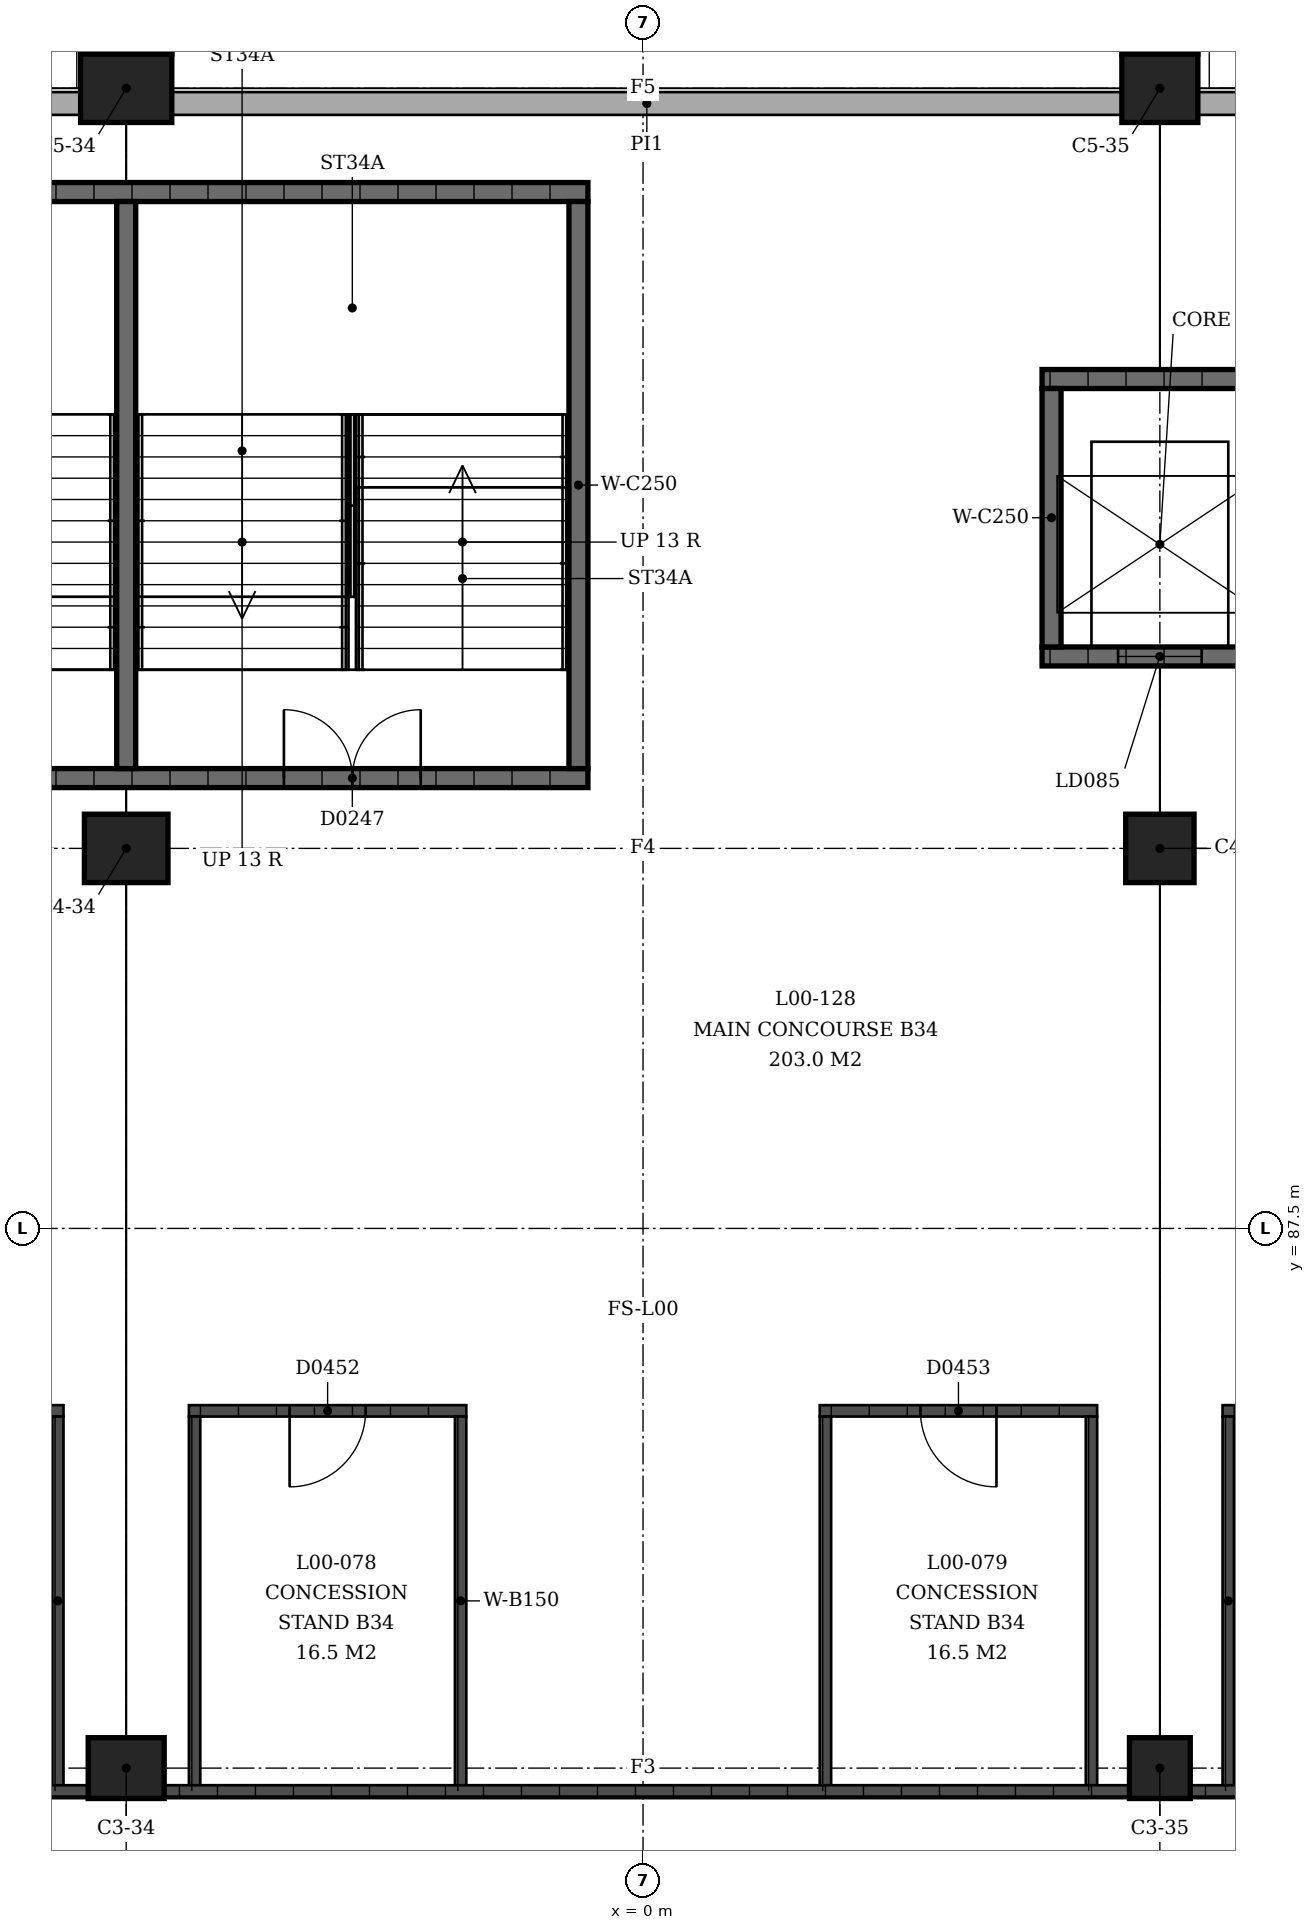
"""IFC4 building model, lengths in metres.
Left out: names, types, materials, properties, quantities, classifications, styles, units other than length and angle.
Written with IfcOpenShell. Run it as: python <this file> out.ifc"""

import sys

from ifc_helpers import new_model, si_unit, direction, frame, frame_2d, origin, origin_2d, place, context, subcontext, project, spatial, rectangle, extrude, element, fill, save


model = new_model("IFC4")
c1 = context("Model", 3, precision=1e-05, world=origin(), true_north=direction((0.0, 1.0)))
c2 = subcontext(c1, "Body", "Model", "MODEL_VIEW")
j1 = project(units=[si_unit("LENGTHUNIT", "METRE"), si_unit("PLANEANGLEUNIT", "RADIAN")], contexts=[c1])
p1 = place(None, origin())
s1 = spatial("IfcSite", under=j1, at=p1, CompositionType="ELEMENT")
p2 = place(p1, origin())
s2 = spatial("IfcBuilding", under=s1, at=p2, CompositionType="ELEMENT")
p3 = place(p2, origin())
s3 = spatial("IfcBuildingStorey", under=s2, at=p3, CompositionType="ELEMENT", Elevation=0.0)
p4 = place(p3, frame((-6.8, 80.4, 0.0), z_axis=(0.0, 0.0, 1.0), x_axis=(-1.0, 0.0, 0.0)))
e1 = element("IfcColumn", 1, at=p4, inside=s3, PredefinedType="COLUMN", context=c2, shape_type="SweptSolid", body=[
    extrude(rectangle(XDim=1.0, YDim=0.8, at=origin_2d()), origin(), (0.0, 0.0, 1.0), 4.5),
])
p5 = place(p3, frame((-6.8, 92.5, 0.0), z_axis=(0.0, 0.0, 1.0), x_axis=(-1.0, 0.0, 0.0)))
e2 = element("IfcColumn", 2, at=p5, inside=s3, PredefinedType="COLUMN", context=c2, shape_type="SweptSolid", body=[
    extrude(rectangle(XDim=1.1, YDim=0.9, at=origin_2d()), origin(), (0.0, 0.0, 1.0), 4.5),
])
p6 = place(p3, frame((-6.8, 102.5, 0.0), z_axis=(0.0, 0.0, 1.0), x_axis=(-1.0, 0.0, 0.0)))
e3 = element("IfcColumn", 3, at=p6, inside=s3, PredefinedType="COLUMN", context=c2, shape_type="SweptSolid", body=[
    extrude(rectangle(XDim=1.2, YDim=0.9, at=origin_2d()), origin(), (0.0, 0.0, 1.0), 4.5),
])
p7 = place(p3, frame((6.8, 80.4, 0.0), z_axis=(0.0, 0.0, 1.0), x_axis=(-1.0, 0.0, 0.0)))
e4 = element("IfcColumn", 4, at=p7, inside=s3, PredefinedType="COLUMN", context=c2, shape_type="SweptSolid", body=[
    extrude(rectangle(XDim=0.8, YDim=0.8, at=origin_2d()), origin(), (0.0, 0.0, 1.0), 4.5),
])
p8 = place(p3, frame((6.8, 92.5, 0.0), z_axis=(0.0, 0.0, 1.0), x_axis=(-1.0, 0.0, 0.0)))
e5 = element("IfcColumn", 5, at=p8, inside=s3, PredefinedType="COLUMN", context=c2, shape_type="SweptSolid", body=[
    extrude(rectangle(XDim=0.9, YDim=0.9, at=origin_2d()), origin(), (0.0, 0.0, 1.0), 4.5),
])
p9 = place(p3, frame((6.8, 102.5, 0.0), z_axis=(0.0, 0.0, 1.0), x_axis=(-1.0, 0.0, 0.0)))
e6 = element("IfcColumn", 6, at=p9, inside=s3, PredefinedType="COLUMN", context=c2, shape_type="SweptSolid", body=[
    extrude(rectangle(XDim=1.0, YDim=0.9, at=origin_2d()), origin(), (0.0, 0.0, 1.0), 4.5),
])
p10 = place(p3, frame((-19.9, 102.3, 0.0), z_axis=(0.0, 0.0, 1.0), x_axis=(1.0, 0.0, 0.0)))
e7 = element("IfcWall", 7, at=p10, inside=s3, PredefinedType="SOLIDWALL", context=c2, shape_type="SweptSolid", body=[
    extrude(rectangle(XDim=12.5, YDim=0.3, at=frame_2d((6.25, 0.0))), origin(), (0.0, 0.0, 1.0), 3.09),
])
p11 = place(p10, frame((1.363, 0.0, 0.0)))
e8 = element("IfcOpeningElement", 8, at=p11, cuts=e7, PredefinedType="OPENING", context=c2, shape_type="SweptSolid", body=[
    extrude(rectangle(XDim=4.8, YDim=2.4, at=frame_2d((2.4, 1.2))), frame((0.0, 0.16, 0.0), z_axis=(0.0, -1.0, 0.0), x_axis=(1.0, 0.0, 0.0)), (0.0, 0.0, 1.0), 0.32),
])
p12 = place(p3, frame((-6.2, 102.3, 0.0), z_axis=(0.0, 0.0, 1.0), x_axis=(1.0, 0.0, 0.0)))
e9 = element("IfcWall", 9, at=p12, inside=s3, PredefinedType="SOLIDWALL", context=c2, shape_type="SweptSolid", body=[
    extrude(rectangle(XDim=12.5, YDim=0.3, at=frame_2d((6.25, 0.0))), origin(), (0.0, 0.0, 1.0), 3.09),
])
p13 = place(p3, frame((7.3, 102.3, 0.0), z_axis=(0.0, 0.0, 1.0), x_axis=(1.0, 0.0, 0.0)))
e10 = element("IfcWall", 10, at=p13, inside=s3, PredefinedType="SOLIDWALL", context=c2, shape_type="SweptSolid", body=[
    extrude(rectangle(XDim=12.5, YDim=0.3, at=frame_2d((6.25, 0.0))), origin(), (0.0, 0.0, 1.0), 3.09),
])
p14 = place(p13, frame((1.363, 0.0, 0.0)))
e11 = element("IfcOpeningElement", 11, at=p14, cuts=e10, PredefinedType="OPENING", context=c2, shape_type="SweptSolid", body=[
    extrude(rectangle(XDim=4.8, YDim=2.4, at=frame_2d((2.4, 1.2))), frame((0.0, 0.16, 0.0), z_axis=(0.0, -1.0, 0.0), x_axis=(1.0, 0.0, 0.0)), (0.0, 0.0, 1.0), 0.32),
])
p15 = place(p3, frame((-0.725, 93.425, 0.0), z_axis=(0.0, 0.0, 1.0), x_axis=(-1.0, 0.0, 0.0)))
e12 = element("IfcWall", 12, at=p15, inside=s3, PredefinedType="SHEAR", context=c2, shape_type="SweptSolid", body=[
    extrude(rectangle(XDim=12.15, YDim=0.25, at=frame_2d((6.075, 0.0))), origin(), (0.0, 0.0, 1.0), 4.09),
])
p16 = place(p15, frame((2.2, 0.0, 0.0)))
e13 = element("IfcOpeningElement", 13, at=p16, cuts=e12, PredefinedType="OPENING", context=c2, shape_type="SweptSolid", body=[
    extrude(rectangle(XDim=1.8, YDim=2.1, at=frame_2d((0.9, 1.05))), frame((0.0, 0.125, 0.0), z_axis=(0.0, -1.0, 0.0), x_axis=(1.0, 0.0, 0.0)), (0.0, 0.0, 1.0), 0.25),
])
p17 = place(p15, frame((8.15, 0.0, 0.0)))
e14 = element("IfcOpeningElement", 14, at=p17, cuts=e12, PredefinedType="OPENING", context=c2, shape_type="SweptSolid", body=[
    extrude(rectangle(XDim=1.8, YDim=2.1, at=frame_2d((0.9, 1.05))), frame((0.0, 0.125, 0.0), z_axis=(0.0, -1.0, 0.0), x_axis=(1.0, 0.0, 0.0)), (0.0, 0.0, 1.0), 0.25),
])
p18 = place(p3, frame((-0.725, 101.135, 0.0), z_axis=(0.0, 0.0, 1.0), x_axis=(-1.0, 0.0, 0.0)))
e15 = element("IfcWall", 15, at=p18, inside=s3, PredefinedType="SHEAR", context=c2, shape_type="SweptSolid", body=[
    extrude(rectangle(XDim=12.15, YDim=0.25, at=frame_2d((6.075, 0.0))), origin(), (0.0, 0.0, 1.0), 4.09),
])
for number, where, z_axis, x_axis in (
    (16, (-0.85, 93.55, 0.0), (0.0, 0.0, 1.0), (0.0, 1.0, 0.0)),
    (17, (-6.8, 93.55, 0.0), (0.0, 0.0, 1.0), (0.0, 1.0, 0.0)),
):
    element("IfcWall", number, at=place(p3, frame(where, z_axis=z_axis, x_axis=x_axis)), inside=s3, PredefinedType="SHEAR", context=c2, shape_type="SweptSolid", body=[
        extrude(rectangle(XDim=7.46, YDim=0.25, at=frame_2d((3.73, 0.0))), origin(), (0.0, 0.0, 1.0), 4.09),
    ])
p19 = place(p3, frame((8.35, 95.025, 0.0), z_axis=(0.0, 0.0, 1.0), x_axis=(-1.0, 0.0, 0.0)))
e18 = element("IfcWall", 18, at=p19, inside=s3, PredefinedType="SHEAR", context=c2, shape_type="SweptSolid", body=[
    extrude(rectangle(XDim=3.1, YDim=0.25, at=frame_2d((1.55, 0.0))), origin(), (0.0, 0.0, 1.0), 4.09),
])
p20 = place(p19, frame((1.0, 0.0, 0.0)))
e19 = element("IfcOpeningElement", 19, at=p20, cuts=e18, PredefinedType="OPENING", context=c2, shape_type="SweptSolid", body=[
    extrude(rectangle(XDim=1.1, YDim=2.1, at=frame_2d((0.55, 1.05))), frame((0.0, 0.125, 0.0), z_axis=(0.0, -1.0, 0.0), x_axis=(1.0, 0.0, 0.0)), (0.0, 0.0, 1.0), 0.25),
])
p21 = place(p3, frame((8.35, 98.675, 0.0), z_axis=(0.0, 0.0, 1.0), x_axis=(-1.0, 0.0, 0.0)))
e20 = element("IfcWall", 20, at=p21, inside=s3, PredefinedType="SHEAR", context=c2, shape_type="SweptSolid", body=[
    extrude(rectangle(XDim=3.1, YDim=0.25, at=frame_2d((1.55, 0.0))), origin(), (0.0, 0.0, 1.0), 4.09),
])
p22 = place(p3, frame((5.375, 95.15, 0.0), z_axis=(0.0, 0.0, 1.0), x_axis=(0.0, 1.0, 0.0)))
e21 = element("IfcWall", 21, at=p22, inside=s3, PredefinedType="SHEAR", context=c2, shape_type="SweptSolid", body=[
    extrude(rectangle(XDim=3.4, YDim=0.25, at=frame_2d((1.7, 0.0))), origin(), (0.0, 0.0, 1.0), 4.09),
])
p23 = place(p3, frame((-7.625, 85.1, 0.0), z_axis=(0.0, 0.0, 1.0), x_axis=(-1.0, 0.0, 0.0)))
e22 = element("IfcWall", 22, at=p23, inside=s3, PredefinedType="SOLIDWALL", context=c2, shape_type="SweptSolid", body=[
    extrude(rectangle(XDim=3.65, YDim=0.15, at=frame_2d((1.825, 0.0))), origin(), (0.0, 0.0, 1.0), 3.0),
])
p24 = place(p23, frame((1.325, 0.0, 0.0)))
e23 = element("IfcOpeningElement", 23, at=p24, cuts=e22, PredefinedType="OPENING", context=c2, shape_type="SweptSolid", body=[
    extrude(rectangle(XDim=1.0, YDim=2.1, at=frame_2d((0.5, 1.05))), frame((0.0, 0.075, 0.0), z_axis=(0.0, -1.0, 0.0), x_axis=(1.0, 0.0, 0.0)), (0.0, 0.0, 1.0), 0.15),
])
p25 = place(p3, frame((-7.7, 80.1, 0.0), z_axis=(0.0, 0.0, 1.0), x_axis=(0.0, 1.0, 0.0)))
e24 = element("IfcWall", 24, at=p25, inside=s3, PredefinedType="SOLIDWALL", context=c2, shape_type="SweptSolid", body=[
    extrude(rectangle(XDim=4.925, YDim=0.15, at=frame_2d((2.462, 0.0))), origin(), (0.0, 0.0, 1.0), 3.0),
])
p26 = place(p3, frame((-5.975, 85.1, 0.0), z_axis=(0.0, 0.0, 1.0), x_axis=(1.0, 0.0, 0.0)))
e25 = element("IfcWall", 25, at=p26, inside=s3, PredefinedType="SOLIDWALL", context=c2, shape_type="SweptSolid", body=[
    extrude(rectangle(XDim=3.65, YDim=0.15, at=frame_2d((1.825, 0.0))), origin(), (0.0, 0.0, 1.0), 3.0),
])
p27 = place(p26, frame((1.325, 0.0, 0.0)))
e26 = element("IfcOpeningElement", 26, at=p27, cuts=e25, PredefinedType="OPENING", context=c2, shape_type="SweptSolid", body=[
    extrude(rectangle(XDim=1.0, YDim=2.1, at=frame_2d((0.5, 1.05))), frame((0.0, 0.075, 0.0), z_axis=(0.0, -1.0, 0.0), x_axis=(1.0, 0.0, 0.0)), (0.0, 0.0, 1.0), 0.15),
])
for number, where, z_axis, x_axis in (
    (27, (-5.9, 80.1, 0.0), (0.0, 0.0, 1.0), (0.0, 1.0, 0.0)),
    (28, (-2.4, 80.1, 0.0), (0.0, 0.0, 1.0), (0.0, 1.0, 0.0)),
):
    element("IfcWall", number, at=place(p3, frame(where, z_axis=z_axis, x_axis=x_axis)), inside=s3, PredefinedType="SOLIDWALL", context=c2, shape_type="SweptSolid", body=[
        extrude(rectangle(XDim=4.925, YDim=0.15, at=frame_2d((2.462, 0.0))), origin(), (0.0, 0.0, 1.0), 3.0),
    ])
p28 = place(p3, frame((2.325, 85.1, 0.0), z_axis=(0.0, 0.0, 1.0), x_axis=(1.0, 0.0, 0.0)))
e29 = element("IfcWall", 29, at=p28, inside=s3, PredefinedType="SOLIDWALL", context=c2, shape_type="SweptSolid", body=[
    extrude(rectangle(XDim=3.65, YDim=0.15, at=frame_2d((1.825, 0.0))), origin(), (0.0, 0.0, 1.0), 3.0),
])
p29 = place(p28, frame((1.325, 0.0, 0.0)))
e30 = element("IfcOpeningElement", 30, at=p29, cuts=e29, PredefinedType="OPENING", context=c2, shape_type="SweptSolid", body=[
    extrude(rectangle(XDim=1.0, YDim=2.1, at=frame_2d((0.5, 1.05))), frame((0.0, 0.075, 0.0), z_axis=(0.0, -1.0, 0.0), x_axis=(1.0, 0.0, 0.0)), (0.0, 0.0, 1.0), 0.15),
])
for number, where, z_axis, x_axis in (
    (31, (2.4, 80.1, 0.0), (0.0, 0.0, 1.0), (0.0, 1.0, 0.0)),
    (32, (5.9, 80.1, 0.0), (0.0, 0.0, 1.0), (0.0, 1.0, 0.0)),
):
    element("IfcWall", number, at=place(p3, frame(where, z_axis=z_axis, x_axis=x_axis)), inside=s3, PredefinedType="SOLIDWALL", context=c2, shape_type="SweptSolid", body=[
        extrude(rectangle(XDim=4.925, YDim=0.15, at=frame_2d((2.462, 0.0))), origin(), (0.0, 0.0, 1.0), 3.0),
    ])
p30 = place(p3, frame((11.275, 85.1, 0.0), z_axis=(0.0, 0.0, 1.0), x_axis=(-1.0, 0.0, 0.0)))
e33 = element("IfcWall", 33, at=p30, inside=s3, PredefinedType="SOLIDWALL", context=c2, shape_type="SweptSolid", body=[
    extrude(rectangle(XDim=3.65, YDim=0.15, at=frame_2d((1.825, 0.0))), origin(), (0.0, 0.0, 1.0), 3.0),
])
p31 = place(p30, frame((1.325, 0.0, 0.0)))
e34 = element("IfcOpeningElement", 34, at=p31, cuts=e33, PredefinedType="OPENING", context=c2, shape_type="SweptSolid", body=[
    extrude(rectangle(XDim=1.0, YDim=2.1, at=frame_2d((0.5, 1.05))), frame((0.0, 0.075, 0.0), z_axis=(0.0, -1.0, 0.0), x_axis=(1.0, 0.0, 0.0)), (0.0, 0.0, 1.0), 0.15),
])
p32 = place(p3, frame((7.7, 80.1, 0.0), z_axis=(0.0, 0.0, 1.0), x_axis=(0.0, 1.0, 0.0)))
e35 = element("IfcWall", 35, at=p32, inside=s3, PredefinedType="SOLIDWALL", context=c2, shape_type="SweptSolid", body=[
    extrude(rectangle(XDim=4.925, YDim=0.15, at=frame_2d((2.462, 0.0))), origin(), (0.0, 0.0, 1.0), 3.0),
])
p33 = place(p3, frame((-20.0, 80.1, 0.0), z_axis=(0.0, 0.0, 1.0), x_axis=(1.0, 0.0, 0.0)))
e36 = element("IfcWall", 36, at=p33, inside=s3, PredefinedType="SOLIDWALL", context=c2, shape_type="SweptSolid", body=[
    extrude(rectangle(XDim=12.7, YDim=0.15, at=frame_2d((6.35, 0.0))), origin(), (0.0, 0.0, 1.0), 3.0),
])
p34 = place(p33, frame((5.2, 0.0, 0.0)))
e37 = element("IfcOpeningElement", 37, at=p34, cuts=e36, PredefinedType="OPENING", context=c2, shape_type="SweptSolid", body=[
    extrude(rectangle(XDim=2.4, YDim=2.4, at=frame_2d((1.2, 1.2))), frame((0.0, 0.075, 0.0), z_axis=(0.0, -1.0, 0.0), x_axis=(1.0, 0.0, 0.0)), (0.0, 0.0, 1.0), 0.15),
])
p35 = place(p3, frame((-6.3, 80.1, 0.0), z_axis=(0.0, 0.0, 1.0), x_axis=(1.0, 0.0, 0.0)))
e38 = element("IfcWall", 38, at=p35, inside=s3, PredefinedType="SOLIDWALL", context=c2, shape_type="SweptSolid", body=[
    extrude(rectangle(XDim=12.7, YDim=0.15, at=frame_2d((6.35, 0.0))), origin(), (0.0, 0.0, 1.0), 3.0),
])
p36 = place(p3, frame((7.2, 80.1, 0.0), z_axis=(0.0, 0.0, 1.0), x_axis=(1.0, 0.0, 0.0)))
e39 = element("IfcWall", 39, at=p36, inside=s3, PredefinedType="SOLIDWALL", context=c2, shape_type="SweptSolid", body=[
    extrude(rectangle(XDim=12.7, YDim=0.15, at=frame_2d((6.35, 0.0))), origin(), (0.0, 0.0, 1.0), 3.0),
])
p37 = place(p36, frame((5.2, 0.0, 0.0)))
e40 = element("IfcOpeningElement", 40, at=p37, cuts=e39, PredefinedType="OPENING", context=c2, shape_type="SweptSolid", body=[
    extrude(rectangle(XDim=2.4, YDim=2.4, at=frame_2d((1.2, 1.2))), frame((0.0, 0.075, 0.0), z_axis=(0.0, -1.0, 0.0), x_axis=(1.0, 0.0, 0.0)), (0.0, 0.0, 1.0), 0.15),
])
p38 = place(p16, origin())
e41 = element("IfcDoor", 41, at=p38, inside=s3, OperationType="DOUBLE_DOOR_SINGLE_SWING", PredefinedType="DOOR", context=c2, shape_type="SweptSolid", body=[
    extrude(rectangle(XDim=1.8, YDim=2.1, at=frame_2d((0.9, 1.05))), frame((0.0, 0.025, 0.0), z_axis=(0.0, -1.0, 0.0), x_axis=(1.0, 0.0, 0.0)), (0.0, 0.0, 1.0), 0.05),
])
fill(e13, e41)
p39 = place(p20, origin())
e42 = element("IfcDoor", 42, at=p39, inside=s3, OperationType="SLIDING_TO_LEFT", PredefinedType="DOOR", context=c2, shape_type="SweptSolid", body=[
    extrude(rectangle(XDim=1.1, YDim=2.1, at=frame_2d((0.55, 1.05))), frame((0.0, 0.025, 0.0), z_axis=(0.0, -1.0, 0.0), x_axis=(1.0, 0.0, 0.0)), (0.0, 0.0, 1.0), 0.05),
])
fill(e19, e42)
p40 = place(p27, origin())
e43 = element("IfcDoor", 43, at=p40, inside=s3, OperationType="SINGLE_SWING_LEFT", PredefinedType="DOOR", context=c2, shape_type="SweptSolid", body=[
    extrude(rectangle(XDim=1.0, YDim=2.1, at=frame_2d((0.5, 1.05))), frame((0.0, 0.025, 0.0), z_axis=(0.0, -1.0, 0.0), x_axis=(1.0, 0.0, 0.0)), (0.0, 0.0, 1.0), 0.05),
])
fill(e26, e43)
p41 = place(p29, origin())
e44 = element("IfcDoor", 44, at=p41, inside=s3, OperationType="SINGLE_SWING_RIGHT", PredefinedType="DOOR", context=c2, shape_type="SweptSolid", body=[
    extrude(rectangle(XDim=1.0, YDim=2.1, at=frame_2d((0.5, 1.05))), frame((0.0, 0.025, 0.0), z_axis=(0.0, -1.0, 0.0), x_axis=(1.0, 0.0, 0.0)), (0.0, 0.0, 1.0), 0.05),
])
fill(e30, e44)
save(model, sys.argv[1])
